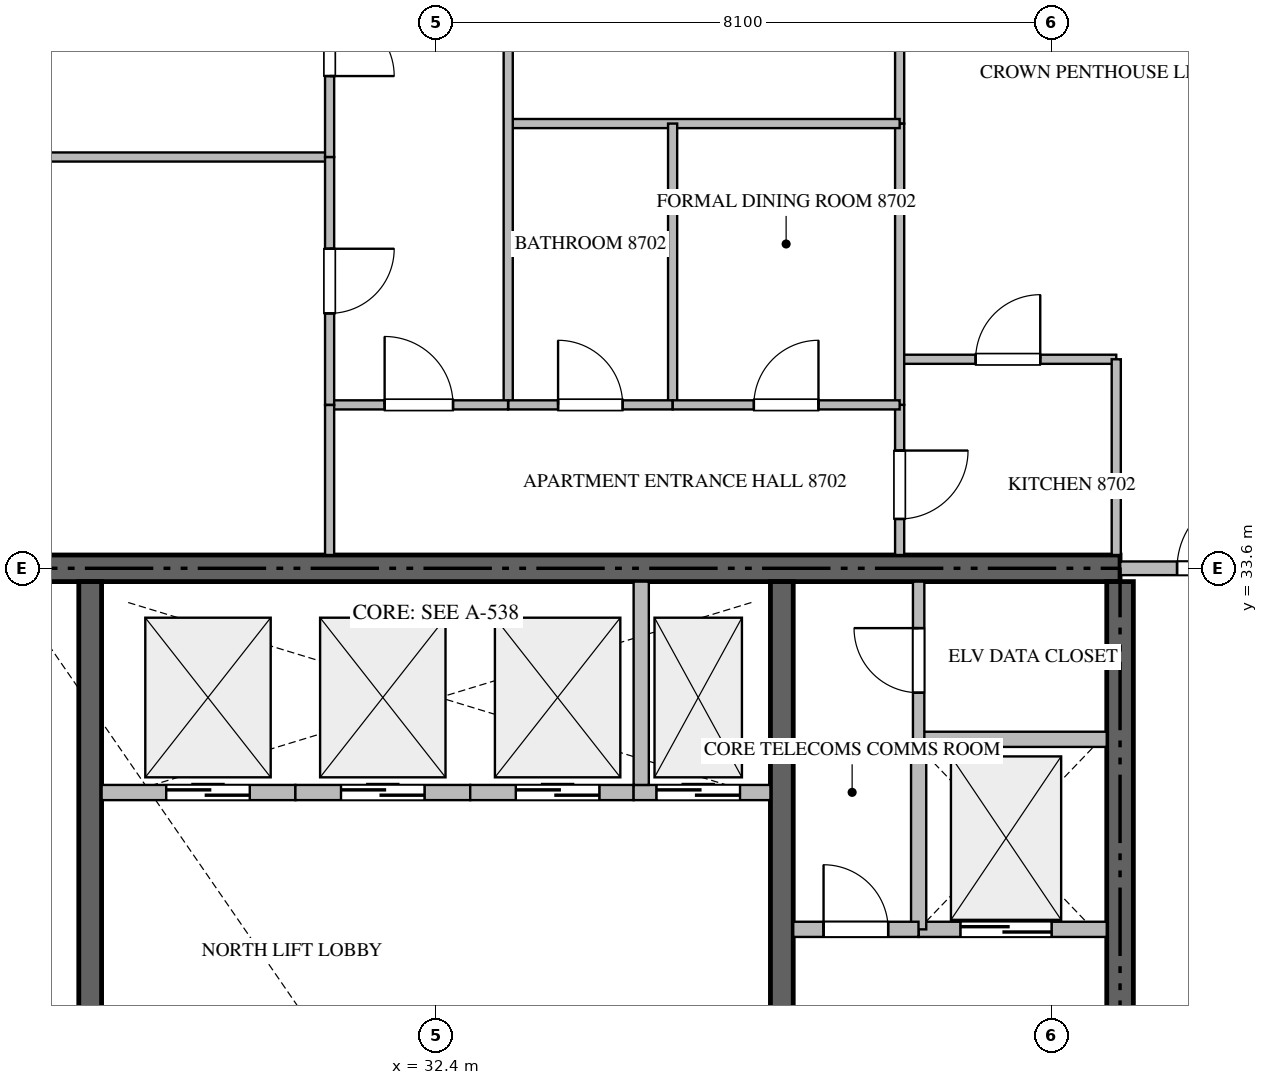
"""IFC4 building model, lengths in metres.
Left out: names, types, materials, properties, quantities, classifications, styles, units other than length and angle.
Written with IfcOpenShell. Run it as: python <this file> out.ifc"""

import sys

from ifc_helpers import new_model, si_unit, direction, frame, frame_2d, origin, place, context, subcontext, project, spatial, rectangle, extrude, source, transform, mapped, element, fill, save


model = new_model("IFC4")
c1 = context("Model", 3, precision=1e-05, world=origin(), true_north=direction((0.0, 1.0)))
c2 = subcontext(c1, "Body", "Model", "MODEL_VIEW")
j1 = project(units=[si_unit("LENGTHUNIT", "METRE"), si_unit("PLANEANGLEUNIT", "RADIAN")], contexts=[c1])
p1 = place(None, origin())
s1 = spatial("IfcSite", under=j1, at=p1, CompositionType="ELEMENT")
p2 = place(p1, origin())
s2 = spatial("IfcBuilding", under=s1, at=p2, CompositionType="ELEMENT")
p3 = place(p2, frame((0.0, 0.0, 353.85)))
s3 = spatial("IfcBuildingStorey", under=s2, at=p3, CompositionType="ELEMENT", Elevation=353.85)
p4 = place(p3, frame((41.4, 33.6, -0.26), z_axis=(0.0, 0.0, 1.0), x_axis=(-1.0, 0.0, 0.0)))
e1 = element("IfcWall", 1, at=p4, inside=s3, PredefinedType="SHEAR", context=c2, shape_type="SweptSolid", body=[
    extrude(rectangle(XDim=18.0, YDim=0.35, at=frame_2d((9.0, 0.0))), origin(), (0.0, 0.0, 1.0), 5.798),
])
p5 = place(p3, frame((41.4, 27.75, -0.26), z_axis=(0.0, 0.0, 1.0), x_axis=(0.0, 1.0, 0.0)))
e2 = element("IfcWall", 2, at=p5, inside=s3, PredefinedType="SHEAR", context=c2, shape_type="SweptSolid", body=[
    extrude(rectangle(XDim=5.675, YDim=0.35, at=frame_2d((2.837, 0.0))), origin(), (0.0, 0.0, 1.0), 5.798),
])
p6 = place(p3, frame((27.85, 23.55, -0.26), z_axis=(0.0, 0.0, 1.0), x_axis=(0.0, 1.0, 0.0)))
e3 = element("IfcWall", 3, at=p6, inside=s3, PredefinedType="SHEAR", context=c2, shape_type="SweptSolid", body=[
    extrude(rectangle(XDim=9.875, YDim=0.3, at=frame_2d((4.938, 0.0))), origin(), (0.0, 0.0, 1.0), 5.798),
])
p7 = place(p3, frame((36.95, 27.05, -0.26), z_axis=(0.0, 0.0, 1.0), x_axis=(0.0, 1.0, 0.0)))
e4 = element("IfcWall", 4, at=p7, inside=s3, PredefinedType="SHEAR", context=c2, shape_type="SweptSolid", body=[
    extrude(rectangle(XDim=6.375, YDim=0.3, at=frame_2d((3.188, 0.0))), origin(), (0.0, 0.0, 1.0), 5.798),
])
p8 = place(p3, frame((38.75, 28.85, 0.0), z_axis=(0.0, 0.0, 1.0), x_axis=(1.0, 0.0, 0.0)))
e5 = element("IfcWall", 5, at=p8, inside=s3, PredefinedType="STANDARD", context=c2, shape_type="SweptSolid", body=[
    extrude(rectangle(XDim=2.475, YDim=0.2, at=frame_2d((1.238, 0.0))), origin(), (0.0, 0.0, 1.0), 5.54),
])
p9 = place(p8, frame((0.55, 0.0, 0.0)))
e6 = element("IfcOpeningElement", 6, at=p9, cuts=e5, PredefinedType="OPENING", context=c2, shape_type="SweptSolid", body=[
    extrude(rectangle(XDim=1.2, YDim=2.2, at=frame_2d((0.6, 1.1))), frame((0.0, 0.11, 0.0), z_axis=(0.0, -1.0, 0.0), x_axis=(1.0, 0.0, 0.0)), (0.0, 0.0, 1.0), 0.22),
])
p10 = place(p3, frame((28.0, 30.65, 0.0), z_axis=(0.0, 0.0, 1.0), x_axis=(1.0, 0.0, 0.0)))
e7 = element("IfcWall", 7, at=p10, inside=s3, PredefinedType="STANDARD", context=c2, shape_type="SweptSolid", body=[
    extrude(rectangle(XDim=2.55, YDim=0.2, at=frame_2d((1.275, 0.0))), origin(), (0.0, 0.0, 1.0), 5.54),
])
p11 = place(p10, frame((0.85, 0.0, 0.0)))
e8 = element("IfcOpeningElement", 8, at=p11, cuts=e7, PredefinedType="OPENING", context=c2, shape_type="SweptSolid", body=[
    extrude(rectangle(XDim=1.1, YDim=2.2, at=frame_2d((0.55, 1.1))), frame((0.0, 0.11, 0.0), z_axis=(0.0, -1.0, 0.0), x_axis=(1.0, 0.0, 0.0)), (0.0, 0.0, 1.0), 0.22),
])
p12 = place(p3, frame((30.55, 30.65, 0.0), z_axis=(0.0, 0.0, 1.0), x_axis=(1.0, 0.0, 0.0)))
e9 = element("IfcWall", 9, at=p12, inside=s3, PredefinedType="STANDARD", context=c2, shape_type="SweptSolid", body=[
    extrude(rectangle(XDim=2.3, YDim=0.2, at=frame_2d((1.15, 0.0))), origin(), (0.0, 0.0, 1.0), 5.54),
])
p13 = place(p12, frame((0.6, 0.0, 0.0)))
e10 = element("IfcOpeningElement", 10, at=p13, cuts=e9, PredefinedType="OPENING", context=c2, shape_type="SweptSolid", body=[
    extrude(rectangle(XDim=1.1, YDim=2.2, at=frame_2d((0.55, 1.1))), frame((0.0, 0.11, 0.0), z_axis=(0.0, -1.0, 0.0), x_axis=(1.0, 0.0, 0.0)), (0.0, 0.0, 1.0), 0.22),
])
p14 = place(p3, frame((32.85, 30.65, 0.0), z_axis=(0.0, 0.0, 1.0), x_axis=(1.0, 0.0, 0.0)))
e11 = element("IfcWall", 11, at=p14, inside=s3, PredefinedType="STANDARD", context=c2, shape_type="SweptSolid", body=[
    extrude(rectangle(XDim=2.15, YDim=0.2, at=frame_2d((1.075, 0.0))), origin(), (0.0, 0.0, 1.0), 5.54),
])
p15 = place(p14, frame((0.6, 0.0, 0.0)))
e12 = element("IfcOpeningElement", 12, at=p15, cuts=e11, PredefinedType="OPENING", context=c2, shape_type="SweptSolid", body=[
    extrude(rectangle(XDim=1.1, YDim=2.2, at=frame_2d((0.55, 1.1))), frame((0.0, 0.11, 0.0), z_axis=(0.0, -1.0, 0.0), x_axis=(1.0, 0.0, 0.0)), (0.0, 0.0, 1.0), 0.22),
])
p16 = place(p3, frame((35.0, 30.65, 0.0), z_axis=(0.0, 0.0, 1.0), x_axis=(1.0, 0.0, 0.0)))
e13 = element("IfcWall", 13, at=p16, inside=s3, PredefinedType="STANDARD", context=c2, shape_type="SweptSolid", body=[
    extrude(rectangle(XDim=1.8, YDim=0.2, at=frame_2d((0.9, 0.0))), origin(), (0.0, 0.0, 1.0), 5.54),
])
p17 = place(p16, frame((0.3, 0.0, 0.0)))
e14 = element("IfcOpeningElement", 14, at=p17, cuts=e13, PredefinedType="OPENING", context=c2, shape_type="SweptSolid", body=[
    extrude(rectangle(XDim=1.1, YDim=2.2, at=frame_2d((0.55, 1.1))), frame((0.0, 0.11, 0.0), z_axis=(0.0, -1.0, 0.0), x_axis=(1.0, 0.0, 0.0)), (0.0, 0.0, 1.0), 0.22),
])
p18 = place(p3, frame((35.1, 30.75, 0.0), z_axis=(0.0, 0.0, 1.0), x_axis=(0.0, 1.0, 0.0)))
e15 = element("IfcWall", 15, at=p18, inside=s3, PredefinedType="STANDARD", context=c2, shape_type="SweptSolid", body=[
    extrude(rectangle(XDim=2.675, YDim=0.2, at=frame_2d((1.337, 0.0))), origin(), (0.0, 0.0, 1.0), 5.54),
])
p19 = place(p3, frame((38.75, 28.85, 0.0), z_axis=(0.0, 0.0, 1.0), x_axis=(0.0, 1.0, 0.0)))
e16 = element("IfcWall", 16, at=p19, inside=s3, PredefinedType="STANDARD", context=c2, shape_type="SweptSolid", body=[
    extrude(rectangle(XDim=2.5, YDim=0.2, at=frame_2d((1.25, 0.0))), origin(), (0.0, 0.0, 1.0), 5.54),
])
p20 = place(p3, frame((38.75, 31.35, 0.0), z_axis=(0.0, 0.0, 1.0), x_axis=(1.0, 0.0, 0.0)))
e17 = element("IfcWall", 17, at=p20, inside=s3, PredefinedType="STANDARD", context=c2, shape_type="SweptSolid", body=[
    extrude(rectangle(XDim=2.475, YDim=0.2, at=frame_2d((1.238, 0.0))), origin(), (0.0, 0.0, 1.0), 5.54),
])
p21 = place(p3, frame((37.1, 28.85, 0.0), z_axis=(0.0, 0.0, 1.0), x_axis=(1.0, 0.0, 0.0)))
e18 = element("IfcWall", 18, at=p21, inside=s3, PredefinedType="STANDARD", context=c2, shape_type="SweptSolid", body=[
    extrude(rectangle(XDim=1.648, YDim=0.2, at=frame_2d((0.824, 0.0))), origin(), (0.0, 0.0, 1.0), 5.54),
])
p22 = place(p21, frame((0.399, 0.0, 0.0)))
e19 = element("IfcOpeningElement", 19, at=p22, cuts=e18, PredefinedType="OPENING", context=c2, shape_type="SweptSolid", body=[
    extrude(rectangle(XDim=0.85, YDim=2.1, at=frame_2d((0.425, 1.05))), frame((0.0, 0.11, 0.0), z_axis=(0.0, -1.0, 0.0), x_axis=(1.0, 0.0, 0.0)), (0.0, 0.0, 1.0), 0.22),
])
p23 = place(p3, frame((38.75, 31.352, 0.0), z_axis=(0.0, 0.0, 1.0), x_axis=(0.0, 1.0, 0.0)))
e20 = element("IfcWall", 20, at=p23, inside=s3, PredefinedType="PARTITIONING", context=c2, shape_type="SweptSolid", body=[
    extrude(rectangle(XDim=2.073, YDim=0.15, at=frame_2d((1.037, 0.0))), origin(), (0.0, 0.0, 1.0), 5.54),
])
p24 = place(p23, frame((0.611, 0.0, 0.0)))
e21 = element("IfcOpeningElement", 21, at=p24, cuts=e20, PredefinedType="OPENING", context=c2, shape_type="SweptSolid", body=[
    extrude(rectangle(XDim=0.85, YDim=2.1, at=frame_2d((0.425, 1.05))), frame((0.0, 0.085, 0.0), z_axis=(0.0, -1.0, 0.0), x_axis=(1.0, 0.0, 0.0)), (0.0, 0.0, 1.0), 0.17),
])
p25 = place(p3, frame((41.402, 33.6, 0.0), z_axis=(0.0, 0.0, 1.0), x_axis=(1.0, 0.0, 0.0)))
e22 = element("IfcWall", 22, at=p25, inside=s3, PredefinedType="PARTITIONING", context=c2, shape_type="SweptSolid", body=[
    extrude(rectangle(XDim=2.496, YDim=0.18, at=frame_2d((1.248, 0.0))), origin(), (0.0, 0.0, 1.0), 5.54),
])
p26 = place(p25, frame((0.748, 0.0, 0.0)))
e23 = element("IfcOpeningElement", 23, at=p26, cuts=e22, PredefinedType="OPENING", context=c2, shape_type="SweptSolid", body=[
    extrude(rectangle(XDim=1.0, YDim=2.15, at=frame_2d((0.5, 1.075))), frame((0.0, 0.1, 0.0), z_axis=(0.0, -1.0, 0.0), x_axis=(1.0, 0.0, 0.0)), (0.0, 0.0, 1.0), 0.2),
])
p27 = place(p3, frame((38.5, 36.35, 0.0), z_axis=(0.0, 0.0, 1.0), x_axis=(1.0, 0.0, 0.0)))
e24 = element("IfcWall", 24, at=p27, inside=s3, PredefinedType="PARTITIONING", context=c2, shape_type="SweptSolid", body=[
    extrude(rectangle(XDim=2.85, YDim=0.12, at=frame_2d((1.425, 0.0))), origin(), (0.0, 0.0, 1.0), 5.54),
])
p28 = place(p27, frame((1.0, 0.0, 0.0)))
e25 = element("IfcOpeningElement", 25, at=p28, cuts=e24, PredefinedType="OPENING", context=c2, shape_type="SweptSolid", body=[
    extrude(rectangle(XDim=0.85, YDim=2.1, at=frame_2d((0.425, 1.05))), frame((0.0, 0.07, 0.0), z_axis=(0.0, -1.0, 0.0), x_axis=(1.0, 0.0, 0.0)), (0.0, 0.0, 1.0), 0.14),
])
p29 = place(p3, frame((41.35, 36.35, 0.0), z_axis=(0.0, 0.0, 1.0), x_axis=(0.0, -1.0, 0.0)))
e26 = element("IfcWall", 26, at=p29, inside=s3, PredefinedType="PARTITIONING", context=c2, shape_type="SweptSolid", body=[
    extrude(rectangle(XDim=2.575, YDim=0.12, at=frame_2d((1.288, 0.0))), origin(), (0.0, 0.0, 1.0), 5.54),
])
p30 = place(p3, frame((38.5, 35.75, 0.0), z_axis=(0.0, 0.0, 1.0), x_axis=(0.0, -1.0, 0.0)))
e27 = element("IfcWall", 27, at=p30, inside=s3, PredefinedType="PARTITIONING", context=c2, shape_type="SweptSolid", body=[
    extrude(rectangle(XDim=1.975, YDim=0.12, at=frame_2d((0.988, 0.0))), origin(), (0.0, 0.0, 1.0), 5.54),
])
p31 = place(p30, frame((0.601, 0.0, 0.0)))
e28 = element("IfcOpeningElement", 28, at=p31, cuts=e27, PredefinedType="OPENING", context=c2, shape_type="SweptSolid", body=[
    extrude(rectangle(XDim=0.9, YDim=2.1, at=frame_2d((0.45, 1.05))), frame((0.0, 0.07, 0.0), z_axis=(0.0, -1.0, 0.0), x_axis=(1.0, 0.0, 0.0)), (0.0, 0.0, 1.0), 0.14),
])
p32 = place(p3, frame((38.5, 46.305, 0.0), z_axis=(0.0, 0.0, 1.0), x_axis=(0.0, -1.0, 0.0)))
e29 = element("IfcWall", 29, at=p32, inside=s3, PredefinedType="PARTITIONING", context=c2, shape_type="SweptSolid", body=[
    extrude(rectangle(XDim=6.854, YDim=0.12, at=frame_2d((3.427, 0.0))), origin(), (0.0, 0.0, 1.0), 5.54),
])
p33 = place(p32, frame((3.275, 0.0, 0.0)))
e30 = element("IfcOpeningElement", 30, at=p33, cuts=e29, PredefinedType="OPENING", context=c2, shape_type="SweptSolid", body=[
    extrude(rectangle(XDim=0.9, YDim=2.1, at=frame_2d((0.45, 1.05))), frame((0.0, 0.07, 0.0), z_axis=(0.0, -1.0, 0.0), x_axis=(1.0, 0.0, 0.0)), (0.0, 0.0, 1.0), 0.14),
])
p34 = place(p3, frame((38.5, 39.449, 0.0), z_axis=(0.0, 0.0, 1.0), x_axis=(0.0, -1.0, 0.0)))
e31 = element("IfcWall", 31, at=p34, inside=s3, PredefinedType="PARTITIONING", context=c2, shape_type="SweptSolid", body=[
    extrude(rectangle(XDim=3.697, YDim=0.12, at=frame_2d((1.849, 0.0))), origin(), (0.0, 0.0, 1.0), 5.54),
])
p35 = place(p3, frame((33.35, 39.451, 0.0), z_axis=(0.0, 0.0, 1.0), x_axis=(1.0, 0.0, 0.0)))
e32 = element("IfcWall", 32, at=p35, inside=s3, PredefinedType="PARTITIONING", context=c2, shape_type="SweptSolid", body=[
    extrude(rectangle(XDim=5.15, YDim=0.12, at=frame_2d((2.575, 0.0))), origin(), (0.0, 0.0, 1.0), 5.54),
])
p36 = place(p3, frame((33.35, 46.305, 0.0), z_axis=(0.0, 0.0, 1.0), x_axis=(0.0, -1.0, 0.0)))
e33 = element("IfcWall", 33, at=p36, inside=s3, PredefinedType="PARTITIONING", context=c2, shape_type="SweptSolid", body=[
    extrude(rectangle(XDim=10.555, YDim=0.12, at=frame_2d((5.277, 0.0))), origin(), (0.0, 0.0, 1.0), 5.54),
])
p37 = place(p3, frame((35.513, 39.451, 0.0), z_axis=(0.0, 0.0, 1.0), x_axis=(0.0, -1.0, 0.0)))
e34 = element("IfcWall", 34, at=p37, inside=s3, PredefinedType="PARTITIONING", context=c2, shape_type="SweptSolid", body=[
    extrude(rectangle(XDim=3.701, YDim=0.12, at=frame_2d((1.851, 0.0))), origin(), (0.0, 0.0, 1.0), 5.54),
])
p38 = place(p3, frame((33.35, 35.75, 0.0), z_axis=(0.0, 0.0, 1.0), x_axis=(1.0, 0.0, 0.0)))
e35 = element("IfcWall", 35, at=p38, inside=s3, PredefinedType="PARTITIONING", context=c2, shape_type="SweptSolid", body=[
    extrude(rectangle(XDim=2.163, YDim=0.12, at=frame_2d((1.082, 0.0))), origin(), (0.0, 0.0, 1.0), 5.54),
])
p39 = place(p38, frame((0.656, 0.0, 0.0)))
e36 = element("IfcOpeningElement", 36, at=p39, cuts=e35, PredefinedType="OPENING", context=c2, shape_type="SweptSolid", body=[
    extrude(rectangle(XDim=0.85, YDim=2.1, at=frame_2d((0.425, 1.05))), frame((0.0, 0.07, 0.0), z_axis=(0.0, -1.0, 0.0), x_axis=(1.0, 0.0, 0.0)), (0.0, 0.0, 1.0), 0.14),
])
p40 = place(p3, frame((35.515, 35.75, 0.0), z_axis=(0.0, 0.0, 1.0), x_axis=(1.0, 0.0, 0.0)))
e37 = element("IfcWall", 37, at=p40, inside=s3, PredefinedType="PARTITIONING", context=c2, shape_type="SweptSolid", body=[
    extrude(rectangle(XDim=2.985, YDim=0.12, at=frame_2d((1.493, 0.0))), origin(), (0.0, 0.0, 1.0), 5.54),
])
p41 = place(p40, frame((1.067, 0.0, 0.0)))
e38 = element("IfcOpeningElement", 38, at=p41, cuts=e37, PredefinedType="OPENING", context=c2, shape_type="SweptSolid", body=[
    extrude(rectangle(XDim=0.85, YDim=2.1, at=frame_2d((0.425, 1.05))), frame((0.0, 0.07, 0.0), z_axis=(0.0, -1.0, 0.0), x_axis=(1.0, 0.0, 0.0)), (0.0, 0.0, 1.0), 0.14),
])
p42 = place(p3, frame((31.0, 35.75, 0.0), z_axis=(0.0, 0.0, 1.0), x_axis=(1.0, 0.0, 0.0)))
e39 = element("IfcWall", 39, at=p42, inside=s3, PredefinedType="PARTITIONING", context=c2, shape_type="SweptSolid", body=[
    extrude(rectangle(XDim=2.348, YDim=0.12, at=frame_2d((1.174, 0.0))), origin(), (0.0, 0.0, 1.0), 5.54),
])
p43 = place(p42, frame((0.724, 0.0, 0.0)))
e40 = element("IfcOpeningElement", 40, at=p43, cuts=e39, PredefinedType="OPENING", context=c2, shape_type="SweptSolid", body=[
    extrude(rectangle(XDim=0.9, YDim=2.1, at=frame_2d((0.45, 1.05))), frame((0.0, 0.07, 0.0), z_axis=(0.0, -1.0, 0.0), x_axis=(1.0, 0.0, 0.0)), (0.0, 0.0, 1.0), 0.14),
])
p44 = place(p3, frame((26.3, 39.011, 0.0), z_axis=(0.0, 0.0, 1.0), x_axis=(1.0, 0.0, 0.0)))
e41 = element("IfcWall", 41, at=p44, inside=s3, PredefinedType="PARTITIONING", context=c2, shape_type="SweptSolid", body=[
    extrude(rectangle(XDim=4.7, YDim=0.12, at=frame_2d((2.35, 0.0))), origin(), (0.0, 0.0, 1.0), 5.54),
])
p45 = place(p3, frame((31.0, 41.99, 0.0), z_axis=(0.0, 0.0, 1.0), x_axis=(0.0, -1.0, 0.0)))
e42 = element("IfcWall", 42, at=p45, inside=s3, PredefinedType="PARTITIONING", context=c2, shape_type="SweptSolid", body=[
    extrude(rectangle(XDim=2.979, YDim=0.12, at=frame_2d((1.49, 0.0))), origin(), (0.0, 0.0, 1.0), 5.54),
])
p46 = place(p45, frame((1.064, 0.0, 0.0)))
e43 = element("IfcOpeningElement", 43, at=p46, cuts=e42, PredefinedType="OPENING", context=c2, shape_type="SweptSolid", body=[
    extrude(rectangle(XDim=0.85, YDim=2.1, at=frame_2d((0.425, 1.05))), frame((0.0, 0.07, 0.0), z_axis=(0.0, -1.0, 0.0), x_axis=(1.0, 0.0, 0.0)), (0.0, 0.0, 1.0), 0.14),
])
p47 = place(p3, frame((31.0, 39.009, 0.0), z_axis=(0.0, 0.0, 1.0), x_axis=(0.0, -1.0, 0.0)))
e44 = element("IfcWall", 44, at=p47, inside=s3, PredefinedType="PARTITIONING", context=c2, shape_type="SweptSolid", body=[
    extrude(rectangle(XDim=3.259, YDim=0.12, at=frame_2d((1.629, 0.0))), origin(), (0.0, 0.0, 1.0), 5.54),
])
p48 = place(p47, frame((1.205, 0.0, 0.0)))
e45 = element("IfcOpeningElement", 45, at=p48, cuts=e44, PredefinedType="OPENING", context=c2, shape_type="SweptSolid", body=[
    extrude(rectangle(XDim=0.85, YDim=2.1, at=frame_2d((0.425, 1.05))), frame((0.0, 0.07, 0.0), z_axis=(0.0, -1.0, 0.0), x_axis=(1.0, 0.0, 0.0)), (0.0, 0.0, 1.0), 0.14),
])
p49 = place(p3, frame((31.0, 35.748, 0.0), z_axis=(0.0, 0.0, 1.0), x_axis=(0.0, -1.0, 0.0)))
e46 = element("IfcWall", 46, at=p49, inside=s3, PredefinedType="PARTITIONING", context=c2, shape_type="SweptSolid", body=[
    extrude(rectangle(XDim=1.973, YDim=0.12, at=frame_2d((0.987, 0.0))), origin(), (0.0, 0.0, 1.0), 5.54),
])
m1 = source(origin(), c2, "Body", "SweptSolid", [
    extrude(rectangle(XDim=1.2, YDim=2.2, at=frame_2d((0.6, 1.1))), frame((0.0, 0.025, 0.0), z_axis=(0.0, -1.0, 0.0), x_axis=(1.0, 0.0, 0.0)), (0.0, 0.0, 1.0), 0.05),
])
p50 = place(p9, origin())
e47 = element("IfcDoor", 47, at=p50, inside=s3, OperationType="DOUBLE_DOOR_SLIDING", PredefinedType="DOOR", context=c2, shape_type="MappedRepresentation", body=[
    mapped(m1, transform((0.0, 0.0, 0.0), scale=1.0)),
])
fill(e6, e47)
m2 = source(origin(), c2, "Body", "SweptSolid", [
    extrude(rectangle(XDim=1.1, YDim=2.2, at=frame_2d((0.55, 1.1))), frame((0.0, 0.025, 0.0), z_axis=(0.0, -1.0, 0.0), x_axis=(1.0, 0.0, 0.0)), (0.0, 0.0, 1.0), 0.05),
])
p51 = place(p11, origin())
e48 = element("IfcDoor", 48, at=p51, inside=s3, OperationType="DOUBLE_DOOR_SLIDING", PredefinedType="DOOR", context=c2, shape_type="MappedRepresentation", body=[
    mapped(m2, transform((0.0, 0.0, 0.0), scale=1.0)),
])
fill(e8, e48)
p52 = place(p13, origin())
e49 = element("IfcDoor", 49, at=p52, inside=s3, OperationType="DOUBLE_DOOR_SLIDING", PredefinedType="DOOR", context=c2, shape_type="MappedRepresentation", body=[
    mapped(m2, transform((0.0, 0.0, 0.0), scale=1.0)),
])
fill(e10, e49)
p53 = place(p15, origin())
e50 = element("IfcDoor", 50, at=p53, inside=s3, OperationType="DOUBLE_DOOR_SLIDING", PredefinedType="DOOR", context=c2, shape_type="MappedRepresentation", body=[
    mapped(m2, transform((0.0, 0.0, 0.0), scale=1.0)),
])
fill(e12, e50)
p54 = place(p17, origin())
e51 = element("IfcDoor", 51, at=p54, inside=s3, OperationType="DOUBLE_DOOR_SLIDING", PredefinedType="DOOR", context=c2, shape_type="MappedRepresentation", body=[
    mapped(m2, transform((0.0, 0.0, 0.0), scale=1.0)),
])
fill(e14, e51)
m3 = source(origin(), c2, "Body", "SweptSolid", [
    extrude(rectangle(XDim=0.85, YDim=2.1, at=frame_2d((0.425, 1.05))), frame((0.0, 0.025, 0.0), z_axis=(0.0, -1.0, 0.0), x_axis=(1.0, 0.0, 0.0)), (0.0, 0.0, 1.0), 0.05),
])
p55 = place(p22, origin())
e52 = element("IfcDoor", 52, at=p55, inside=s3, OperationType="SINGLE_SWING_LEFT", PredefinedType="DOOR", context=c2, shape_type="MappedRepresentation", body=[
    mapped(m3, transform((0.0, 0.0, 0.0), scale=1.0)),
])
fill(e19, e52)
p56 = place(p24, origin())
e53 = element("IfcDoor", 53, at=p56, inside=s3, OperationType="SINGLE_SWING_RIGHT", PredefinedType="DOOR", context=c2, shape_type="MappedRepresentation", body=[
    mapped(m3, transform((0.0, 0.0, 0.0), scale=1.0)),
])
fill(e21, e53)
m4 = source(origin(), c2, "Body", "SweptSolid", [
    extrude(rectangle(XDim=1.0, YDim=2.15, at=frame_2d((0.5, 1.075))), frame((0.0, 0.025, 0.0), z_axis=(0.0, -1.0, 0.0), x_axis=(1.0, 0.0, 0.0)), (0.0, 0.0, 1.0), 0.05),
])
p57 = place(p26, origin())
e54 = element("IfcDoor", 54, at=p57, inside=s3, OperationType="SINGLE_SWING_RIGHT", PredefinedType="DOOR", context=c2, shape_type="MappedRepresentation", body=[
    mapped(m4, transform((0.0, 0.0, 0.0), scale=1.0)),
])
fill(e23, e54)
p58 = place(p28, origin())
e55 = element("IfcDoor", 55, at=p58, inside=s3, OperationType="SINGLE_SWING_RIGHT", PredefinedType="DOOR", context=c2, shape_type="MappedRepresentation", body=[
    mapped(m3, transform((0.0, 0.0, 0.0), scale=1.0)),
])
fill(e25, e55)
m5 = source(origin(), c2, "Body", "SweptSolid", [
    extrude(rectangle(XDim=0.9, YDim=2.1, at=frame_2d((0.45, 1.05))), frame((0.0, 0.025, 0.0), z_axis=(0.0, -1.0, 0.0), x_axis=(1.0, 0.0, 0.0)), (0.0, 0.0, 1.0), 0.05),
])
p59 = place(p31, origin())
e56 = element("IfcDoor", 56, at=p59, inside=s3, OperationType="SINGLE_SWING_LEFT", PredefinedType="DOOR", context=c2, shape_type="MappedRepresentation", body=[
    mapped(m5, transform((0.0, 0.0, 0.0), scale=1.0)),
])
fill(e28, e56)
p60 = place(p39, origin())
e57 = element("IfcDoor", 57, at=p60, inside=s3, OperationType="SINGLE_SWING_LEFT", PredefinedType="DOOR", context=c2, shape_type="MappedRepresentation", body=[
    mapped(m3, transform((0.0, 0.0, 0.0), scale=1.0)),
])
fill(e36, e57)
p61 = place(p41, origin())
e58 = element("IfcDoor", 58, at=p61, inside=s3, OperationType="SINGLE_SWING_RIGHT", PredefinedType="DOOR", context=c2, shape_type="MappedRepresentation", body=[
    mapped(m3, transform((0.0, 0.0, 0.0), scale=1.0)),
])
fill(e38, e58)
p62 = place(p43, origin())
e59 = element("IfcDoor", 59, at=p62, inside=s3, OperationType="SINGLE_SWING_LEFT", PredefinedType="DOOR", context=c2, shape_type="MappedRepresentation", body=[
    mapped(m5, transform((0.0, 0.0, 0.0), scale=1.0)),
])
fill(e40, e59)
p63 = place(p46, origin())
e60 = element("IfcDoor", 60, at=p63, inside=s3, OperationType="SINGLE_SWING_RIGHT", PredefinedType="DOOR", context=c2, shape_type="MappedRepresentation", body=[
    mapped(m3, transform((0.0, 0.0, 0.0), scale=1.0)),
])
fill(e43, e60)
p64 = place(p48, origin())
e61 = element("IfcDoor", 61, at=p64, inside=s3, OperationType="SINGLE_SWING_LEFT", PredefinedType="DOOR", context=c2, shape_type="MappedRepresentation", body=[
    mapped(m3, transform((0.0, 0.0, 0.0), scale=1.0)),
])
fill(e45, e61)
save(model, sys.argv[1])
